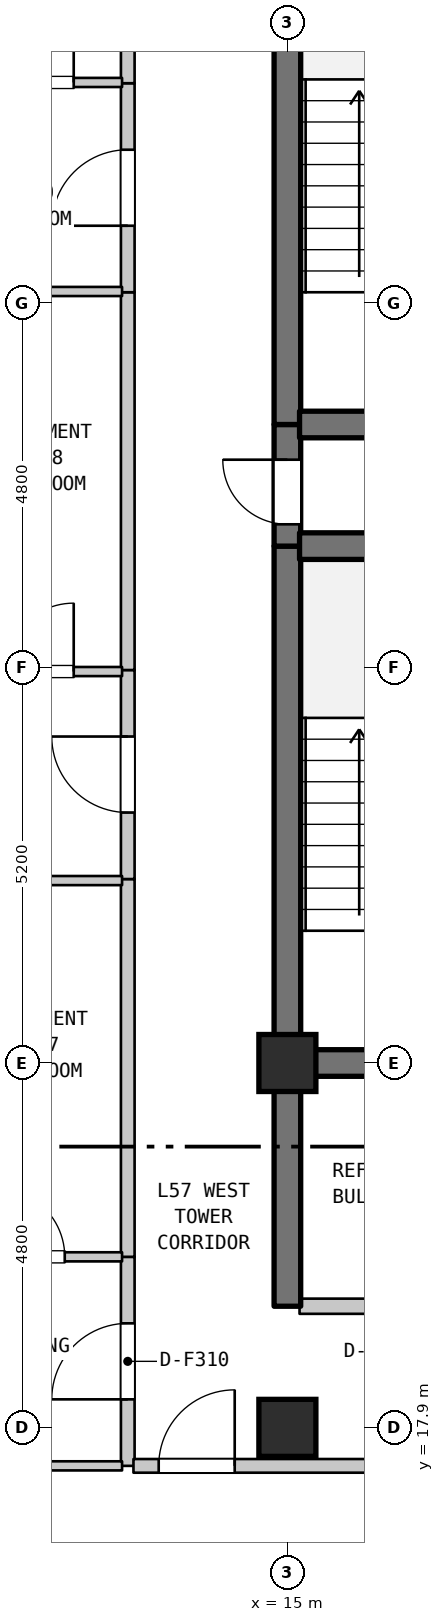
"""IFC4 building model, lengths in metres.
Left out: names, types, materials, properties, quantities, classifications, styles, units other than length and angle.
Written with IfcOpenShell. Run it as: python <this file> out.ifc"""

import sys

from ifc_helpers import new_model, si_unit, direction, frame, frame_2d, origin, origin_2d, place, context, subcontext, project, spatial, rectangle, extrude, element, fill, save


model = new_model("IFC4")
c1 = context("Model", 3, precision=1e-05, world=origin(), true_north=direction((0.0, 1.0)))
c2 = subcontext(c1, "Body", "Model", "MODEL_VIEW")
j1 = project(units=[si_unit("LENGTHUNIT", "METRE"), si_unit("PLANEANGLEUNIT", "RADIAN")], contexts=[c1])
p1 = place(None, origin())
s1 = spatial("IfcSite", under=j1, at=p1, CompositionType="ELEMENT")
p2 = place(p1, origin())
s2 = spatial("IfcBuilding", under=s1, at=p2, CompositionType="ELEMENT")
p3 = place(p2, frame((0.0, 0.0, 230.2)))
s3 = spatial("IfcBuildingStorey", under=s2, at=p3, CompositionType="ELEMENT", Elevation=230.2)
for number, where, z_axis, x_axis in (
    (1, (15.0, 17.9, 0.0), (0.0, 0.0, 1.0), (1.0, 0.0, 0.0)),
    (2, (15.0, 22.7, 0.0), (0.0, 0.0, 1.0), (1.0, 0.0, 0.0)),
):
    element("IfcColumn", number, at=place(p3, frame(where, z_axis=z_axis, x_axis=x_axis)), inside=s3, PredefinedType="COLUMN", context=c2, shape_type="SweptSolid", body=[
        extrude(rectangle(XDim=0.75, YDim=0.75, at=origin_2d()), origin(), (0.0, 0.0, 1.0), 3.7),
    ])
p4 = place(p3, frame((12.9, 17.4, 0.0), z_axis=(0.0, 0.0, 1.0), x_axis=(0.0, 1.0, 0.0)))
e3 = element("IfcWall", 3, at=p4, inside=s3, PredefinedType="STANDARD", context=c2, shape_type="SweptSolid", body=[
    extrude(rectangle(XDim=2.75, YDim=0.18, at=frame_2d((1.375, 0.0))), origin(), (0.0, 0.0, 1.0), 3.39),
])
p5 = place(p4, frame((0.875, 0.0, 0.0)))
e4 = element("IfcOpeningElement", 4, at=p5, cuts=e3, PredefinedType="OPENING", context=c2, shape_type="SweptSolid", body=[
    extrude(rectangle(XDim=1.0, YDim=2.15, at=frame_2d((0.5, 1.075))), frame((0.0, 0.1, 0.0), z_axis=(0.0, -1.0, 0.0), x_axis=(1.0, 0.0, 0.0)), (0.0, 0.0, 1.0), 0.2),
])
p6 = place(p3, frame((12.9, 20.15, 0.0), z_axis=(0.0, 0.0, 1.0), x_axis=(0.0, 1.0, 0.0)))
e5 = element("IfcWall", 5, at=p6, inside=s3, PredefinedType="STANDARD", context=c2, shape_type="SweptSolid", body=[
    extrude(rectangle(XDim=4.97, YDim=0.18, at=frame_2d((2.485, 0.0))), origin(), (0.0, 0.0, 1.0), 3.39),
])
p7 = place(p3, frame((12.9, 25.12, 0.0), z_axis=(0.0, 0.0, 1.0), x_axis=(0.0, 1.0, 0.0)))
e6 = element("IfcWall", 6, at=p7, inside=s3, PredefinedType="STANDARD", context=c2, shape_type="SweptSolid", body=[
    extrude(rectangle(XDim=2.75, YDim=0.18, at=frame_2d((1.375, 0.0))), origin(), (0.0, 0.0, 1.0), 3.39),
])
p8 = place(p7, frame((0.875, 0.0, 0.0)))
e7 = element("IfcOpeningElement", 7, at=p8, cuts=e6, PredefinedType="OPENING", context=c2, shape_type="SweptSolid", body=[
    extrude(rectangle(XDim=1.0, YDim=2.15, at=frame_2d((0.5, 1.075))), frame((0.0, 0.1, 0.0), z_axis=(0.0, -1.0, 0.0), x_axis=(1.0, 0.0, 0.0)), (0.0, 0.0, 1.0), 0.2),
])
p9 = place(p3, frame((12.9, 27.87, 0.0), z_axis=(0.0, 0.0, 1.0), x_axis=(0.0, 1.0, 0.0)))
e8 = element("IfcWall", 8, at=p9, inside=s3, PredefinedType="STANDARD", context=c2, shape_type="SweptSolid", body=[
    extrude(rectangle(XDim=4.97, YDim=0.18, at=frame_2d((2.485, 0.0))), origin(), (0.0, 0.0, 1.0), 3.39),
])
p10 = place(p3, frame((12.9, 32.84, 0.0), z_axis=(0.0, 0.0, 1.0), x_axis=(0.0, 1.0, 0.0)))
e9 = element("IfcWall", 9, at=p10, inside=s3, PredefinedType="STANDARD", context=c2, shape_type="SweptSolid", body=[
    extrude(rectangle(XDim=2.75, YDim=0.18, at=frame_2d((1.375, 0.0))), origin(), (0.0, 0.0, 1.0), 3.39),
])
p11 = place(p10, frame((0.875, 0.0, 0.0)))
e10 = element("IfcOpeningElement", 10, at=p11, cuts=e9, PredefinedType="OPENING", context=c2, shape_type="SweptSolid", body=[
    extrude(rectangle(XDim=1.0, YDim=2.15, at=frame_2d((0.5, 1.075))), frame((0.0, 0.1, 0.0), z_axis=(0.0, -1.0, 0.0), x_axis=(1.0, 0.0, 0.0)), (0.0, 0.0, 1.0), 0.2),
])
p12 = place(p3, frame((12.9, 35.59, 0.0), z_axis=(0.0, 0.0, 1.0), x_axis=(0.0, 1.0, 0.0)))
e11 = element("IfcWall", 11, at=p12, inside=s3, PredefinedType="STANDARD", context=c2, shape_type="SweptSolid", body=[
    extrude(rectangle(XDim=4.51, YDim=0.18, at=frame_2d((2.255, 0.0))), origin(), (0.0, 0.0, 1.0), 3.39),
])
p13 = place(p3, frame((15.0, 19.5, 0.0), z_axis=(0.0, 0.0, 1.0), x_axis=(0.0, 1.0, 0.0)))
e12 = element("IfcWall", 12, at=p13, inside=s3, PredefinedType="SHEAR", context=c2, shape_type="SweptSolid", body=[
    extrude(rectangle(XDim=3.2, YDim=0.35, at=frame_2d((1.6, 0.0))), origin(), (0.0, 0.0, 1.0), 3.39),
])
p14 = place(p3, frame((15.0, 22.7, 0.0), z_axis=(0.0, 0.0, 1.0), x_axis=(0.0, 1.0, 0.0)))
e13 = element("IfcWall", 13, at=p14, inside=s3, PredefinedType="SHEAR", context=c2, shape_type="SweptSolid", body=[
    extrude(rectangle(XDim=6.8, YDim=0.35, at=frame_2d((3.4, 0.0))), origin(), (0.0, 0.0, 1.0), 3.39),
])
p15 = place(p3, frame((15.0, 29.5, 0.0), z_axis=(0.0, 0.0, 1.0), x_axis=(0.0, 1.0, 0.0)))
e14 = element("IfcWall", 14, at=p15, inside=s3, PredefinedType="SHEAR", context=c2, shape_type="SweptSolid", body=[
    extrude(rectangle(XDim=1.6, YDim=0.35, at=frame_2d((0.8, 0.0))), origin(), (0.0, 0.0, 1.0), 3.39),
])
p16 = place(p15, frame((0.287, 0.0, 0.0)))
e15 = element("IfcOpeningElement", 15, at=p16, cuts=e14, PredefinedType="OPENING", context=c2, shape_type="SweptSolid", body=[
    extrude(rectangle(XDim=0.85, YDim=2.1, at=frame_2d((0.425, 1.05))), frame((0.0, 0.185, 0.0), z_axis=(0.0, -1.0, 0.0), x_axis=(1.0, 0.0, 0.0)), (0.0, 0.0, 1.0), 0.37),
])
p17 = place(p3, frame((15.0, 31.1, 0.0), z_axis=(0.0, 0.0, 1.0), x_axis=(0.0, 1.0, 0.0)))
e16 = element("IfcWall", 16, at=p17, inside=s3, PredefinedType="SHEAR", context=c2, shape_type="SweptSolid", body=[
    extrude(rectangle(XDim=6.8, YDim=0.35, at=frame_2d((3.4, 0.0))), origin(), (0.0, 0.0, 1.0), 3.39),
])
p18 = place(p3, frame((8.973, 17.4, 0.0), z_axis=(0.0, 0.0, 1.0), x_axis=(1.0, 0.0, 0.0)))
e17 = element("IfcWall", 17, at=p18, inside=s3, PredefinedType="PARTITIONING", context=c2, shape_type="SweptSolid", body=[
    extrude(rectangle(XDim=3.852, YDim=0.12, at=frame_2d((1.926, 0.0))), origin(), (0.0, 0.0, 1.0), 3.39),
])
p19 = place(p3, frame((12.975, 17.4, 0.0), z_axis=(0.0, 0.0, 1.0), x_axis=(1.0, 0.0, 0.0)))
e18 = element("IfcWall", 18, at=p19, inside=s3, PredefinedType="STANDARD", context=c2, shape_type="SweptSolid", body=[
    extrude(rectangle(XDim=3.18, YDim=0.18, at=frame_2d((1.59, 0.0))), origin(), (0.0, 0.0, 1.0), 3.39),
])
p20 = place(p19, frame((0.332, 0.0, 0.0)))
e19 = element("IfcOpeningElement", 19, at=p20, cuts=e18, PredefinedType="OPENING", context=c2, shape_type="SweptSolid", body=[
    extrude(rectangle(XDim=1.0, YDim=2.15, at=frame_2d((0.5, 1.075))), frame((0.0, 0.1, 0.0), z_axis=(0.0, -1.0, 0.0), x_axis=(1.0, 0.0, 0.0)), (0.0, 0.0, 1.0), 0.2),
])
p21 = place(p3, frame((15.16, 19.5, 0.0), z_axis=(0.0, 0.0, 1.0), x_axis=(1.0, 0.0, 0.0)))
e20 = element("IfcWall", 20, at=p21, inside=s3, PredefinedType="STANDARD", context=c2, shape_type="SweptSolid", body=[
    extrude(rectangle(XDim=3.68, YDim=0.2, at=frame_2d((1.84, 0.0))), origin(), (0.0, 0.0, 1.0), 3.39),
])
p22 = place(p21, frame((1.39, 0.0, 0.0)))
e21 = element("IfcOpeningElement", 21, at=p22, cuts=e20, PredefinedType="OPENING", context=c2, shape_type="SweptSolid", body=[
    extrude(rectangle(XDim=0.9, YDim=2.15, at=frame_2d((0.45, 1.075))), frame((0.0, 0.11, 0.0), z_axis=(0.0, -1.0, 0.0), x_axis=(1.0, 0.0, 0.0)), (0.0, 0.0, 1.0), 0.22),
])
p23 = place(p3, frame((10.53, 20.15, 0.0), z_axis=(0.0, 0.0, 1.0), x_axis=(1.0, 0.0, 0.0)))
e22 = element("IfcWall", 22, at=p23, inside=s3, PredefinedType="PARTITIONING", context=c2, shape_type="SweptSolid", body=[
    extrude(rectangle(XDim=2.295, YDim=0.12, at=frame_2d((1.147, 0.0))), origin(), (0.0, 0.0, 1.0), 3.39),
])
p24 = place(p23, frame((0.641, 0.0, 0.0)))
e23 = element("IfcOpeningElement", 23, at=p24, cuts=e22, PredefinedType="OPENING", context=c2, shape_type="SweptSolid", body=[
    extrude(rectangle(XDim=0.9, YDim=2.1, at=frame_2d((0.45, 1.05))), frame((0.0, 0.07, 0.0), z_axis=(0.0, -1.0, 0.0), x_axis=(1.0, 0.0, 0.0)), (0.0, 0.0, 1.0), 0.14),
])
p25 = place(p3, frame((15.16, 22.7, 0.0), z_axis=(0.0, 0.0, 1.0), x_axis=(1.0, 0.0, 0.0)))
e24 = element("IfcWall", 24, at=p25, inside=s3, PredefinedType="SHEAR", context=c2, shape_type="SweptSolid", body=[
    extrude(rectangle(XDim=3.68, YDim=0.35, at=frame_2d((1.84, 0.0))), origin(), (0.0, 0.0, 1.0), 3.39),
])
p26 = place(p3, frame((10.53, 25.1, 0.0), z_axis=(0.0, 0.0, 1.0), x_axis=(1.0, 0.0, 0.0)))
e25 = element("IfcWall", 25, at=p26, inside=s3, PredefinedType="PARTITIONING", context=c2, shape_type="SweptSolid", body=[
    extrude(rectangle(XDim=2.295, YDim=0.12, at=frame_2d((1.147, 0.0))), origin(), (0.0, 0.0, 1.0), 3.39),
])
p27 = place(p3, frame((10.623, 27.85, 0.0), z_axis=(0.0, 0.0, 1.0), x_axis=(1.0, 0.0, 0.0)))
e26 = element("IfcWall", 26, at=p27, inside=s3, PredefinedType="PARTITIONING", context=c2, shape_type="SweptSolid", body=[
    extrude(rectangle(XDim=2.202, YDim=0.12, at=frame_2d((1.101, 0.0))), origin(), (0.0, 0.0, 1.0), 3.39),
])
p28 = place(p27, frame((0.666, 0.0, 0.0)))
e27 = element("IfcOpeningElement", 27, at=p28, cuts=e26, PredefinedType="OPENING", context=c2, shape_type="SweptSolid", body=[
    extrude(rectangle(XDim=0.9, YDim=2.1, at=frame_2d((0.45, 1.05))), frame((0.0, 0.07, 0.0), z_axis=(0.0, -1.0, 0.0), x_axis=(1.0, 0.0, 0.0)), (0.0, 0.0, 1.0), 0.14),
])
for number, where, z_axis, x_axis in (
    (28, (15.16, 29.5, 0.0), (0.0, 0.0, 1.0), (1.0, 0.0, 0.0)),
    (29, (15.16, 31.1, 0.0), (0.0, 0.0, 1.0), (1.0, 0.0, 0.0)),
):
    element("IfcWall", number, at=place(p3, frame(where, z_axis=z_axis, x_axis=x_axis)), inside=s3, PredefinedType="SHEAR", context=c2, shape_type="SweptSolid", body=[
        extrude(rectangle(XDim=3.68, YDim=0.35, at=frame_2d((1.84, 0.0))), origin(), (0.0, 0.0, 1.0), 3.39),
    ])
p29 = place(p3, frame((10.623, 32.85, 0.0), z_axis=(0.0, 0.0, 1.0), x_axis=(1.0, 0.0, 0.0)))
e30 = element("IfcWall", 30, at=p29, inside=s3, PredefinedType="PARTITIONING", context=c2, shape_type="SweptSolid", body=[
    extrude(rectangle(XDim=2.202, YDim=0.12, at=frame_2d((1.101, 0.0))), origin(), (0.0, 0.0, 1.0), 3.39),
])
p30 = place(p3, frame((10.623, 35.6, 0.0), z_axis=(0.0, 0.0, 1.0), x_axis=(1.0, 0.0, 0.0)))
e31 = element("IfcWall", 31, at=p30, inside=s3, PredefinedType="PARTITIONING", context=c2, shape_type="SweptSolid", body=[
    extrude(rectangle(XDim=2.202, YDim=0.12, at=frame_2d((1.101, 0.0))), origin(), (0.0, 0.0, 1.0), 3.39),
])
p31 = place(p30, frame((0.666, 0.0, 0.0)))
e32 = element("IfcOpeningElement", 32, at=p31, cuts=e31, PredefinedType="OPENING", context=c2, shape_type="SweptSolid", body=[
    extrude(rectangle(XDim=0.9, YDim=2.1, at=frame_2d((0.45, 1.05))), frame((0.0, 0.07, 0.0), z_axis=(0.0, -1.0, 0.0), x_axis=(1.0, 0.0, 0.0)), (0.0, 0.0, 1.0), 0.14),
])
p32 = place(p5, origin())
e33 = element("IfcDoor", 33, at=p32, inside=s3, OperationType="SINGLE_SWING_LEFT", PredefinedType="DOOR", context=c2, shape_type="SweptSolid", body=[
    extrude(rectangle(XDim=1.0, YDim=2.15, at=frame_2d((0.5, 1.075))), frame((0.0, 0.025, 0.0), z_axis=(0.0, -1.0, 0.0), x_axis=(1.0, 0.0, 0.0)), (0.0, 0.0, 1.0), 0.05),
])
fill(e4, e33)
p33 = place(p8, origin())
e34 = element("IfcDoor", 34, at=p33, inside=s3, OperationType="SINGLE_SWING_RIGHT", PredefinedType="DOOR", context=c2, shape_type="SweptSolid", body=[
    extrude(rectangle(XDim=1.0, YDim=2.15, at=frame_2d((0.5, 1.075))), frame((0.0, 0.025, 0.0), z_axis=(0.0, -1.0, 0.0), x_axis=(1.0, 0.0, 0.0)), (0.0, 0.0, 1.0), 0.05),
])
fill(e7, e34)
p34 = place(p11, origin())
e35 = element("IfcDoor", 35, at=p34, inside=s3, OperationType="SINGLE_SWING_LEFT", PredefinedType="DOOR", context=c2, shape_type="SweptSolid", body=[
    extrude(rectangle(XDim=1.0, YDim=2.15, at=frame_2d((0.5, 1.075))), frame((0.0, 0.025, 0.0), z_axis=(0.0, -1.0, 0.0), x_axis=(1.0, 0.0, 0.0)), (0.0, 0.0, 1.0), 0.05),
])
fill(e10, e35)
p35 = place(p16, origin())
e36 = element("IfcDoor", 36, at=p35, inside=s3, OperationType="SINGLE_SWING_RIGHT", PredefinedType="DOOR", context=c2, shape_type="SweptSolid", body=[
    extrude(rectangle(XDim=0.85, YDim=2.1, at=frame_2d((0.425, 1.05))), frame((0.0, 0.025, 0.0), z_axis=(0.0, -1.0, 0.0), x_axis=(1.0, 0.0, 0.0)), (0.0, 0.0, 1.0), 0.05),
])
fill(e15, e36)
p36 = place(p20, origin())
e37 = element("IfcDoor", 37, at=p36, inside=s3, OperationType="SINGLE_SWING_RIGHT", PredefinedType="DOOR", context=c2, shape_type="SweptSolid", body=[
    extrude(rectangle(XDim=1.0, YDim=2.15, at=frame_2d((0.5, 1.075))), frame((0.0, 0.025, 0.0), z_axis=(0.0, -1.0, 0.0), x_axis=(1.0, 0.0, 0.0)), (0.0, 0.0, 1.0), 0.05),
])
fill(e19, e37)
p37 = place(p24, origin())
e38 = element("IfcDoor", 38, at=p37, inside=s3, OperationType="SINGLE_SWING_LEFT", PredefinedType="DOOR", context=c2, shape_type="SweptSolid", body=[
    extrude(rectangle(XDim=0.9, YDim=2.1, at=frame_2d((0.45, 1.05))), frame((0.0, 0.025, 0.0), z_axis=(0.0, -1.0, 0.0), x_axis=(1.0, 0.0, 0.0)), (0.0, 0.0, 1.0), 0.05),
])
fill(e23, e38)
p38 = place(p28, origin())
e39 = element("IfcDoor", 39, at=p38, inside=s3, OperationType="SINGLE_SWING_RIGHT", PredefinedType="DOOR", context=c2, shape_type="SweptSolid", body=[
    extrude(rectangle(XDim=0.9, YDim=2.1, at=frame_2d((0.45, 1.05))), frame((0.0, 0.025, 0.0), z_axis=(0.0, -1.0, 0.0), x_axis=(1.0, 0.0, 0.0)), (0.0, 0.0, 1.0), 0.05),
])
fill(e27, e39)
p39 = place(p31, origin())
e40 = element("IfcDoor", 40, at=p39, inside=s3, OperationType="SINGLE_SWING_RIGHT", PredefinedType="DOOR", context=c2, shape_type="SweptSolid", body=[
    extrude(rectangle(XDim=0.9, YDim=2.1, at=frame_2d((0.45, 1.05))), frame((0.0, 0.025, 0.0), z_axis=(0.0, -1.0, 0.0), x_axis=(1.0, 0.0, 0.0)), (0.0, 0.0, 1.0), 0.05),
])
fill(e32, e40)
save(model, sys.argv[1])
